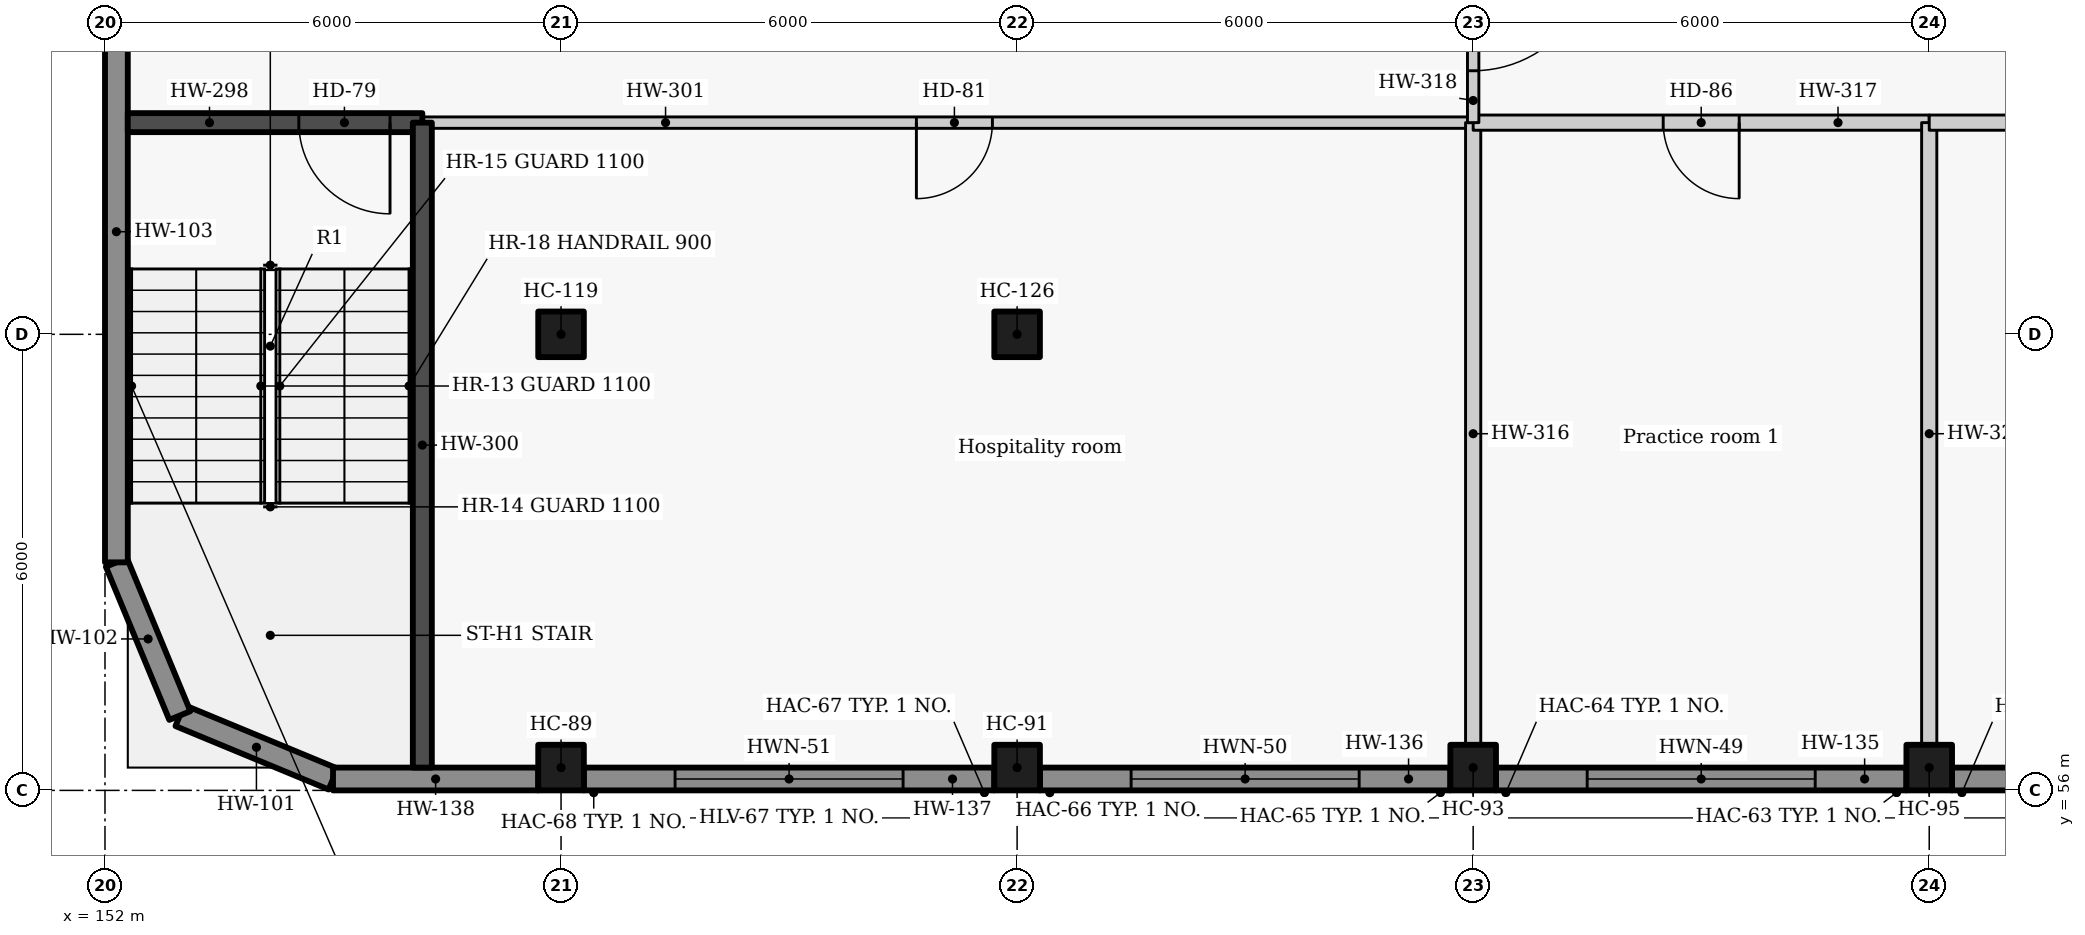
"""IFC4 building model, lengths in metres.
Left out: names, types, materials, properties, quantities, classifications, styles, units other than length and angle.
Written with IfcOpenShell. Run it as: python <this file> out.ifc"""

import sys

from ifc_helpers import new_model, si_unit, direction, frame, frame_2d, origin, origin_2d, place, context, subcontext, project, spatial, rectangle, extrude, element, fill, save


model = new_model("IFC4")
c1 = context("Model", 3, precision=1e-05, world=origin(), true_north=direction((0.0, 1.0)))
c2 = subcontext(c1, "Body", "Model", "MODEL_VIEW")
j1 = project(units=[si_unit("LENGTHUNIT", "METRE"), si_unit("PLANEANGLEUNIT", "RADIAN")], contexts=[c1])
p1 = place(None, origin())
s1 = spatial("IfcSite", under=j1, at=p1, CompositionType="ELEMENT")
p2 = place(p1, origin())
s2 = spatial("IfcBuilding", under=s1, at=p2, CompositionType="ELEMENT")
p3 = place(p2, frame((0.0, 0.0, 11.4)))
s3 = spatial("IfcBuildingStorey", under=s2, at=p3, CompositionType="ELEMENT", Elevation=11.4)
for number, where, z_axis, x_axis in (
    (1, (158.0, 56.3, 0.0), (0.0, 0.0, 1.0), (1.0, 0.0, 0.0)),
    (2, (164.0, 56.3, 0.0), (0.0, 0.0, 1.0), (1.0, 0.0, 0.0)),
    (3, (170.0, 56.3, 0.0), (0.0, 0.0, 1.0), (1.0, 0.0, 0.0)),
    (4, (176.0, 56.3, 0.0), (0.0, 0.0, 1.0), (1.0, 0.0, 0.0)),
    (5, (158.0, 62.0, 0.0), (0.0, 0.0, 1.0), (1.0, 0.0, 0.0)),
    (6, (164.0, 62.0, 0.0), (0.0, 0.0, 1.0), (1.0, 0.0, 0.0)),
):
    element("IfcColumn", number, at=place(p3, frame(where, z_axis=z_axis, x_axis=x_axis)), inside=s3, PredefinedType="COLUMN", context=c2, shape_type="SweptSolid", body=[
        extrude(rectangle(XDim=0.6, YDim=0.6, at=origin_2d()), origin(), (0.0, 0.0, 1.0), 4.2),
    ])
for number, where, z_axis, x_axis in (
    (7, (155.0, 56.15, 0.0), (0.0, 0.0, 1.0), (-0.924, 0.383, 0.0)),
    (8, (152.985, 56.985, 0.0), (0.0, 0.0, 1.0), (-0.383, 0.924, 0.0)),
):
    element("IfcWall", number, at=place(p3, frame(where, z_axis=z_axis, x_axis=x_axis)), inside=s3, PredefinedType="SOLIDWALL", context=c2, shape_type="SweptSolid", body=[
        extrude(rectangle(XDim=2.181, YDim=0.3, at=frame_2d((1.091, 0.0))), origin(), (0.0, 0.0, 1.0), 4.2),
    ])
p4 = place(p3, frame((152.15, 59.0, 0.0), z_axis=(0.0, 0.0, 1.0), x_axis=(0.0, 1.0, 0.0)))
e9 = element("IfcWall", 9, at=p4, inside=s3, PredefinedType="SOLIDWALL", context=c2, shape_type="SweptSolid", body=[
    extrude(rectangle(XDim=8.7, YDim=0.3, at=frame_2d((4.35, 0.0))), origin(), (0.0, 0.0, 1.0), 4.2),
])
p5 = place(p3, frame((181.7, 56.15, 0.0), z_axis=(0.0, 0.0, 1.0), x_axis=(-1.0, 0.0, 0.0)))
e10 = element("IfcWall", 10, at=p5, inside=s3, PredefinedType="SOLIDWALL", context=c2, shape_type="SweptSolid", body=[
    extrude(rectangle(XDim=5.4, YDim=0.3, at=frame_2d((2.7, 0.0))), origin(), (0.0, 0.0, 1.0), 4.2),
])
p6 = place(p5, frame((1.2, 0.0, 0.9)))
e11 = element("IfcOpeningElement", 11, at=p6, cuts=e10, PredefinedType="OPENING", context=c2, shape_type="SweptSolid", body=[
    extrude(rectangle(XDim=3.0, YDim=1.8, at=frame_2d((1.5, 0.9))), frame((0.0, 0.16, 0.0), z_axis=(0.0, -1.0, 0.0), x_axis=(1.0, 0.0, 0.0)), (0.0, 0.0, 1.0), 0.32),
])
p7 = place(p3, frame((175.7, 56.15, 0.0), z_axis=(0.0, 0.0, 1.0), x_axis=(-1.0, 0.0, 0.0)))
e12 = element("IfcWall", 12, at=p7, inside=s3, PredefinedType="SOLIDWALL", context=c2, shape_type="SweptSolid", body=[
    extrude(rectangle(XDim=5.4, YDim=0.3, at=frame_2d((2.7, 0.0))), origin(), (0.0, 0.0, 1.0), 4.2),
])
p8 = place(p7, frame((1.2, 0.0, 0.9)))
e13 = element("IfcOpeningElement", 13, at=p8, cuts=e12, PredefinedType="OPENING", context=c2, shape_type="SweptSolid", body=[
    extrude(rectangle(XDim=3.0, YDim=1.8, at=frame_2d((1.5, 0.9))), frame((0.0, 0.16, 0.0), z_axis=(0.0, -1.0, 0.0), x_axis=(1.0, 0.0, 0.0)), (0.0, 0.0, 1.0), 0.32),
])
p9 = place(p3, frame((169.7, 56.15, 0.0), z_axis=(0.0, 0.0, 1.0), x_axis=(-1.0, 0.0, 0.0)))
e14 = element("IfcWall", 14, at=p9, inside=s3, PredefinedType="SOLIDWALL", context=c2, shape_type="SweptSolid", body=[
    extrude(rectangle(XDim=5.4, YDim=0.3, at=frame_2d((2.7, 0.0))), origin(), (0.0, 0.0, 1.0), 4.2),
])
p10 = place(p9, frame((1.2, 0.0, 0.9)))
e15 = element("IfcOpeningElement", 15, at=p10, cuts=e14, PredefinedType="OPENING", context=c2, shape_type="SweptSolid", body=[
    extrude(rectangle(XDim=3.0, YDim=1.8, at=frame_2d((1.5, 0.9))), frame((0.0, 0.16, 0.0), z_axis=(0.0, -1.0, 0.0), x_axis=(1.0, 0.0, 0.0)), (0.0, 0.0, 1.0), 0.32),
])
p11 = place(p3, frame((163.7, 56.15, 0.0), z_axis=(0.0, 0.0, 1.0), x_axis=(-1.0, 0.0, 0.0)))
e16 = element("IfcWall", 16, at=p11, inside=s3, PredefinedType="SOLIDWALL", context=c2, shape_type="SweptSolid", body=[
    extrude(rectangle(XDim=5.4, YDim=0.3, at=frame_2d((2.7, 0.0))), origin(), (0.0, 0.0, 1.0), 4.2),
])
p12 = place(p11, frame((1.2, 0.0, 0.9)))
e17 = element("IfcOpeningElement", 17, at=p12, cuts=e16, PredefinedType="OPENING", context=c2, shape_type="SweptSolid", body=[
    extrude(rectangle(XDim=3.0, YDim=1.8, at=frame_2d((1.5, 0.9))), frame((0.0, 0.16, 0.0), z_axis=(0.0, -1.0, 0.0), x_axis=(1.0, 0.0, 0.0)), (0.0, 0.0, 1.0), 0.32),
])
p13 = place(p3, frame((157.7, 56.15, 0.0), z_axis=(0.0, 0.0, 1.0), x_axis=(-1.0, 0.0, 0.0)))
e18 = element("IfcWall", 18, at=p13, inside=s3, PredefinedType="SOLIDWALL", context=c2, shape_type="SweptSolid", body=[
    extrude(rectangle(XDim=2.7, YDim=0.3, at=frame_2d((1.35, 0.0))), origin(), (0.0, 0.0, 1.0), 4.2),
])
p14 = place(p3, frame((156.175, 64.785, 0.0), z_axis=(0.0, 0.0, 1.0), x_axis=(-1.0, 0.0, 0.0)))
e19 = element("IfcWall", 19, at=p14, inside=s3, PredefinedType="SOLIDWALL", context=c2, shape_type="SweptSolid", body=[
    extrude(rectangle(XDim=3.875, YDim=0.25, at=frame_2d((1.938, 0.0))), origin(), (0.0, 0.0, 1.0), 4.2),
])
p15 = place(p14, frame((0.425, 0.0, 0.0)))
e20 = element("IfcOpeningElement", 20, at=p15, cuts=e19, PredefinedType="OPENING", context=c2, shape_type="SweptSolid", body=[
    extrude(rectangle(XDim=1.2, YDim=2.1, at=frame_2d((0.6, 1.05))), frame((0.0, 0.135, 0.0), z_axis=(0.0, -1.0, 0.0), x_axis=(1.0, 0.0, 0.0)), (0.0, 0.0, 1.0), 0.27),
])
p16 = place(p3, frame((156.175, 64.785, 0.0), z_axis=(0.0, 0.0, 1.0), x_axis=(0.0, -1.0, 0.0)))
e21 = element("IfcWall", 21, at=p16, inside=s3, PredefinedType="SOLIDWALL", context=c2, shape_type="SweptSolid", body=[
    extrude(rectangle(XDim=8.485, YDim=0.25, at=frame_2d((4.242, 0.0))), origin(), (0.0, 0.0, 1.0), 4.2),
])
p17 = place(p3, frame((170.0, 64.785, 0.0), z_axis=(0.0, 0.0, 1.0), x_axis=(-1.0, 0.0, 0.0)))
e22 = element("IfcWall", 22, at=p17, inside=s3, PredefinedType="PARTITIONING", context=c2, shape_type="SweptSolid", body=[
    extrude(rectangle(XDim=13.825, YDim=0.15, at=frame_2d((6.913, 0.0))), origin(), (0.0, 0.0, 1.0), 3.85),
])
p18 = place(p17, frame((6.325, 0.0, 0.0)))
e23 = element("IfcOpeningElement", 23, at=p18, cuts=e22, PredefinedType="OPENING", context=c2, shape_type="SweptSolid", body=[
    extrude(rectangle(XDim=1.0, YDim=2.1, at=frame_2d((0.5, 1.05))), frame((0.0, 0.085, 0.0), z_axis=(0.0, -1.0, 0.0), x_axis=(1.0, 0.0, 0.0)), (0.0, 0.0, 1.0), 0.17),
])
p19 = place(p3, frame((170.0, 64.785, 0.0), z_axis=(0.0, 0.0, 1.0), x_axis=(0.0, -1.0, 0.0)))
e24 = element("IfcWall", 24, at=p19, inside=s3, PredefinedType="PARTITIONING", context=c2, shape_type="SweptSolid", body=[
    extrude(rectangle(XDim=8.185, YDim=0.2, at=frame_2d((4.092, 0.0))), origin(), (0.0, 0.0, 1.0), 3.85),
])
p20 = place(p3, frame((176.0, 64.785, 0.0), z_axis=(0.0, 0.0, 1.0), x_axis=(-1.0, 0.0, 0.0)))
e25 = element("IfcWall", 25, at=p20, inside=s3, PredefinedType="PARTITIONING", context=c2, shape_type="SweptSolid", body=[
    extrude(rectangle(XDim=6.0, YDim=0.2, at=frame_2d((3.0, 0.0))), origin(), (0.0, 0.0, 1.0), 3.85),
])
p21 = place(p20, frame((2.5, 0.0, 0.0)))
e26 = element("IfcOpeningElement", 26, at=p21, cuts=e25, PredefinedType="OPENING", context=c2, shape_type="SweptSolid", body=[
    extrude(rectangle(XDim=1.0, YDim=2.1, at=frame_2d((0.5, 1.05))), frame((0.0, 0.11, 0.0), z_axis=(0.0, -1.0, 0.0), x_axis=(1.0, 0.0, 0.0)), (0.0, 0.0, 1.0), 0.22),
])
p22 = place(p3, frame((170.0, 67.75, 0.0), z_axis=(0.0, 0.0, 1.0), x_axis=(0.0, -1.0, 0.0)))
e27 = element("IfcWall", 27, at=p22, inside=s3, PredefinedType="PARTITIONING", context=c2, shape_type="SweptSolid", body=[
    extrude(rectangle(XDim=2.965, YDim=0.15, at=frame_2d((1.482, 0.0))), origin(), (0.0, 0.0, 1.0), 3.85),
])
p23 = place(p22, frame((0.683, 0.0, 0.0)))
e28 = element("IfcOpeningElement", 28, at=p23, cuts=e27, PredefinedType="OPENING", context=c2, shape_type="SweptSolid", body=[
    extrude(rectangle(XDim=1.6, YDim=2.1, at=frame_2d((0.8, 1.05))), frame((0.0, 0.085, 0.0), z_axis=(0.0, -1.0, 0.0), x_axis=(1.0, 0.0, 0.0)), (0.0, 0.0, 1.0), 0.17),
])
p24 = place(p3, frame((176.0, 64.785, 0.0), z_axis=(0.0, 0.0, 1.0), x_axis=(0.0, -1.0, 0.0)))
e29 = element("IfcWall", 29, at=p24, inside=s3, PredefinedType="PARTITIONING", context=c2, shape_type="SweptSolid", body=[
    extrude(rectangle(XDim=8.185, YDim=0.2, at=frame_2d((4.092, 0.0))), origin(), (0.0, 0.0, 1.0), 3.85),
])
p25 = place(p3, frame((182.0, 64.785, 0.0), z_axis=(0.0, 0.0, 1.0), x_axis=(-1.0, 0.0, 0.0)))
e30 = element("IfcWall", 30, at=p25, inside=s3, PredefinedType="PARTITIONING", context=c2, shape_type="SweptSolid", body=[
    extrude(rectangle(XDim=6.0, YDim=0.2, at=frame_2d((3.0, 0.0))), origin(), (0.0, 0.0, 1.0), 3.85),
])
p26 = place(p25, frame((2.5, 0.0, 0.0)))
e31 = element("IfcOpeningElement", 31, at=p26, cuts=e30, PredefinedType="OPENING", context=c2, shape_type="SweptSolid", body=[
    extrude(rectangle(XDim=1.0, YDim=2.1, at=frame_2d((0.5, 1.05))), frame((0.0, 0.11, 0.0), z_axis=(0.0, -1.0, 0.0), x_axis=(1.0, 0.0, 0.0)), (0.0, 0.0, 1.0), 0.22),
])
p27 = place(p8, origin())
e32 = element("IfcWindow", 32, at=p27, inside=s3, PartitioningType="SINGLE_PANEL", PredefinedType="WINDOW", context=c2, shape_type="SweptSolid", body=[
    extrude(rectangle(XDim=3.0, YDim=1.8, at=frame_2d((1.5, 0.9))), frame((0.0, 0.03, 0.0), z_axis=(0.0, -1.0, 0.0), x_axis=(1.0, 0.0, 0.0)), (0.0, 0.0, 1.0), 0.06),
])
fill(e13, e32)
p28 = place(p10, origin())
e33 = element("IfcWindow", 33, at=p28, inside=s3, PartitioningType="SINGLE_PANEL", PredefinedType="WINDOW", context=c2, shape_type="SweptSolid", body=[
    extrude(rectangle(XDim=3.0, YDim=1.8, at=frame_2d((1.5, 0.9))), frame((0.0, 0.03, 0.0), z_axis=(0.0, -1.0, 0.0), x_axis=(1.0, 0.0, 0.0)), (0.0, 0.0, 1.0), 0.06),
])
fill(e15, e33)
p29 = place(p12, origin())
e34 = element("IfcWindow", 34, at=p29, inside=s3, PartitioningType="SINGLE_PANEL", PredefinedType="WINDOW", context=c2, shape_type="SweptSolid", body=[
    extrude(rectangle(XDim=3.0, YDim=1.8, at=frame_2d((1.5, 0.9))), frame((0.0, 0.03, 0.0), z_axis=(0.0, -1.0, 0.0), x_axis=(1.0, 0.0, 0.0)), (0.0, 0.0, 1.0), 0.06),
])
fill(e17, e34)
p30 = place(p15, origin())
e35 = element("IfcDoor", 35, at=p30, inside=s3, OperationType="SINGLE_SWING_LEFT", PredefinedType="DOOR", context=c2, shape_type="SweptSolid", body=[
    extrude(rectangle(XDim=1.2, YDim=2.1, at=frame_2d((0.6, 1.05))), frame((0.0, 0.025, 0.0), z_axis=(0.0, -1.0, 0.0), x_axis=(1.0, 0.0, 0.0)), (0.0, 0.0, 1.0), 0.05),
])
fill(e20, e35)
p31 = place(p18, origin())
e36 = element("IfcDoor", 36, at=p31, inside=s3, OperationType="SINGLE_SWING_RIGHT", PredefinedType="DOOR", context=c2, shape_type="SweptSolid", body=[
    extrude(rectangle(XDim=1.0, YDim=2.1, at=frame_2d((0.5, 1.05))), frame((0.0, 0.025, 0.0), z_axis=(0.0, -1.0, 0.0), x_axis=(1.0, 0.0, 0.0)), (0.0, 0.0, 1.0), 0.05),
])
fill(e23, e36)
p32 = place(p21, origin())
e37 = element("IfcDoor", 37, at=p32, inside=s3, OperationType="SINGLE_SWING_LEFT", PredefinedType="DOOR", context=c2, shape_type="SweptSolid", body=[
    extrude(rectangle(XDim=1.0, YDim=2.1, at=frame_2d((0.5, 1.05))), frame((0.0, 0.025, 0.0), z_axis=(0.0, -1.0, 0.0), x_axis=(1.0, 0.0, 0.0)), (0.0, 0.0, 1.0), 0.05),
])
fill(e26, e37)
p33 = place(p23, origin())
e38 = element("IfcDoor", 38, at=p33, inside=s3, OperationType="DOUBLE_DOOR_SINGLE_SWING", PredefinedType="DOOR", context=c2, shape_type="SweptSolid", body=[
    extrude(rectangle(XDim=1.6, YDim=2.1, at=frame_2d((0.8, 1.05))), frame((0.0, 0.025, 0.0), z_axis=(0.0, -1.0, 0.0), x_axis=(1.0, 0.0, 0.0)), (0.0, 0.0, 1.0), 0.05),
])
fill(e28, e38)
save(model, sys.argv[1])
